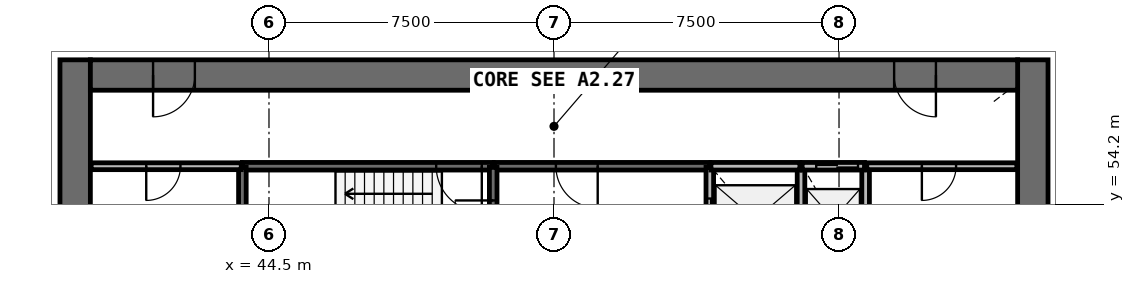
"""IFC4 building model, lengths in metres.
Left out: names, types, materials, properties, quantities, classifications, styles, units other than length and angle.
Written with IfcOpenShell. Run it as: python <this file> out.ifc"""

import sys

from ifc_helpers import new_model, si_unit, direction, frame, frame_2d, origin, place, context, subcontext, project, spatial, rectangle, extrude, source, transform, mapped, element, fill, save


model = new_model("IFC4")
c1 = context("Model", 3, precision=1e-05, world=origin(), true_north=direction((0.0, 1.0)))
c2 = subcontext(c1, "Body", "Model", "MODEL_VIEW")
j1 = project(units=[si_unit("LENGTHUNIT", "METRE"), si_unit("PLANEANGLEUNIT", "RADIAN")], contexts=[c1])
p1 = place(None, origin())
s1 = spatial("IfcSite", under=j1, at=p1, CompositionType="ELEMENT")
p2 = place(p1, origin())
s2 = spatial("IfcBuilding", under=s1, at=p2, CompositionType="ELEMENT")
p3 = place(p2, frame((0.0, 0.0, 112.6)))
s3 = spatial("IfcBuildingStorey", under=s2, at=p3, CompositionType="ELEMENT", Elevation=112.6)
p4 = place(p3, frame((64.6, 38.0, 0.0), z_axis=(0.0, 0.0, 1.0), x_axis=(0.0, 1.0, 0.0)))
e1 = element("IfcWall", 1, at=p4, inside=s3, PredefinedType="SHEAR", context=c2, shape_type="SweptSolid", body=[
    extrude(rectangle(XDim=20.0, YDim=0.8, at=frame_2d((10.0, 0.0))), origin(), (0.0, 0.0, 1.0), 4.1),
])
p5 = place(p4, frame((9.1, 0.0, 0.0)))
e2 = element("IfcOpeningElement", 2, at=p5, cuts=e1, PredefinedType="OPENING", context=c2, shape_type="SweptSolid", body=[
    extrude(rectangle(XDim=1.8, YDim=2.1, at=frame_2d((0.9, 1.05))), frame((0.0, 0.41, 0.0), z_axis=(0.0, -1.0, 0.0), x_axis=(1.0, 0.0, 0.0)), (0.0, 0.0, 1.0), 0.82),
])
p6 = place(p3, frame((39.4, 58.0, 0.0), z_axis=(0.0, 0.0, 1.0), x_axis=(0.0, -1.0, 0.0)))
e3 = element("IfcWall", 3, at=p6, inside=s3, PredefinedType="SHEAR", context=c2, shape_type="SweptSolid", body=[
    extrude(rectangle(XDim=20.0, YDim=0.8, at=frame_2d((10.0, 0.0))), origin(), (0.0, 0.0, 1.0), 4.1),
])
p7 = place(p6, frame((9.1, 0.0, 0.0)))
e4 = element("IfcOpeningElement", 4, at=p7, cuts=e3, PredefinedType="OPENING", context=c2, shape_type="SweptSolid", body=[
    extrude(rectangle(XDim=1.8, YDim=2.1, at=frame_2d((0.9, 1.05))), frame((0.0, 0.41, 0.0), z_axis=(0.0, -1.0, 0.0), x_axis=(1.0, 0.0, 0.0)), (0.0, 0.0, 1.0), 0.82),
])
p8 = place(p3, frame((64.2, 57.6, 0.0), z_axis=(0.0, 0.0, 1.0), x_axis=(-1.0, 0.0, 0.0)))
e5 = element("IfcWall", 5, at=p8, inside=s3, PredefinedType="SHEAR", context=c2, shape_type="SweptSolid", body=[
    extrude(rectangle(XDim=24.4, YDim=0.8, at=frame_2d((12.2, 0.0))), origin(), (0.0, 0.0, 1.0), 4.1),
])
p9 = place(p8, frame((21.65, 0.0, 0.0)))
e6 = element("IfcOpeningElement", 6, at=p9, cuts=e5, PredefinedType="OPENING", context=c2, shape_type="SweptSolid", body=[
    extrude(rectangle(XDim=1.1, YDim=2.1, at=frame_2d((0.55, 1.05))), frame((0.0, 0.41, 0.0), z_axis=(0.0, -1.0, 0.0), x_axis=(1.0, 0.0, 0.0)), (0.0, 0.0, 1.0), 0.82),
])
p10 = place(p8, frame((2.15, 0.0, 0.0)))
e7 = element("IfcOpeningElement", 7, at=p10, cuts=e5, PredefinedType="OPENING", context=c2, shape_type="SweptSolid", body=[
    extrude(rectangle(XDim=1.1, YDim=2.1, at=frame_2d((0.55, 1.05))), frame((0.0, 0.41, 0.0), z_axis=(0.0, -1.0, 0.0), x_axis=(1.0, 0.0, 0.0)), (0.0, 0.0, 1.0), 0.82),
])
p11 = place(p3, frame((50.4, 55.2, 0.0), z_axis=(0.0, 0.0, 1.0), x_axis=(-1.0, 0.0, 0.0)))
e8 = element("IfcWall", 8, at=p11, inside=s3, PredefinedType="SOLIDWALL", context=c2, shape_type="SweptSolid", body=[
    extrude(rectangle(XDim=6.6, YDim=0.2, at=frame_2d((3.3, 0.0))), origin(), (0.0, 0.0, 1.0), 3.7),
])
p12 = place(p11, frame((0.3, 0.0, 0.0)))
e9 = element("IfcOpeningElement", 9, at=p12, cuts=e8, PredefinedType="OPENING", context=c2, shape_type="SweptSolid", body=[
    extrude(rectangle(XDim=1.2, YDim=2.1, at=frame_2d((0.6, 1.05))), frame((0.0, 0.11, 0.0), z_axis=(0.0, -1.0, 0.0), x_axis=(1.0, 0.0, 0.0)), (0.0, 0.0, 1.0), 0.22),
])
p13 = place(p3, frame((56.1, 55.2, 0.0), z_axis=(0.0, 0.0, 1.0), x_axis=(-1.0, 0.0, 0.0)))
e10 = element("IfcWall", 10, at=p13, inside=s3, PredefinedType="SOLIDWALL", context=c2, shape_type="SweptSolid", body=[
    extrude(rectangle(XDim=5.67, YDim=0.2, at=frame_2d((2.835, 0.0))), origin(), (0.0, 0.0, 1.0), 3.7),
])
p14 = place(p13, frame((2.95, 0.0, 0.0)))
e11 = element("IfcOpeningElement", 11, at=p14, cuts=e10, PredefinedType="OPENING", context=c2, shape_type="SweptSolid", body=[
    extrude(rectangle(XDim=1.1, YDim=2.1, at=frame_2d((0.55, 1.05))), frame((0.0, 0.11, 0.0), z_axis=(0.0, -1.0, 0.0), x_axis=(1.0, 0.0, 0.0)), (0.0, 0.0, 1.0), 0.22),
])
p15 = place(p3, frame((50.4, 52.4, 0.0), z_axis=(0.0, 0.0, 1.0), x_axis=(0.0, 1.0, 0.0)))
e12 = element("IfcWall", 12, at=p15, inside=s3, PredefinedType="SOLIDWALL", context=c2, shape_type="SweptSolid", body=[
    extrude(rectangle(XDim=2.77, YDim=0.2, at=frame_2d((1.385, 0.0))), origin(), (0.0, 0.0, 1.0), 3.7),
])
p16 = place(p15, frame((0.9, 0.0, 0.0)))
e13 = element("IfcOpeningElement", 13, at=p16, cuts=e12, PredefinedType="OPENING", context=c2, shape_type="SweptSolid", body=[
    extrude(rectangle(XDim=1.0, YDim=2.1, at=frame_2d((0.5, 1.05))), frame((0.0, 0.11, 0.0), z_axis=(0.0, -1.0, 0.0), x_axis=(1.0, 0.0, 0.0)), (0.0, 0.0, 1.0), 0.22),
])
p17 = place(p3, frame((56.1, 55.17, 0.0), z_axis=(0.0, 0.0, 1.0), x_axis=(0.0, -1.0, 0.0)))
e14 = element("IfcWall", 14, at=p17, inside=s3, PredefinedType="SOLIDWALL", context=c2, shape_type="SweptSolid", body=[
    extrude(rectangle(XDim=2.77, YDim=0.2, at=frame_2d((1.385, 0.0))), origin(), (0.0, 0.0, 1.0), 3.7),
])
p18 = place(p17, frame((0.82, 0.0, 0.0)))
e15 = element("IfcOpeningElement", 15, at=p18, cuts=e14, PredefinedType="OPENING", context=c2, shape_type="SweptSolid", body=[
    extrude(rectangle(XDim=1.1, YDim=2.1, at=frame_2d((0.55, 1.05))), frame((0.0, 0.11, 0.0), z_axis=(0.0, -1.0, 0.0), x_axis=(1.0, 0.0, 0.0)), (0.0, 0.0, 1.0), 0.22),
])
for number, where, z_axis, x_axis in (
    (16, (58.5, 52.4, 0.0), (0.0, 0.0, 1.0), (0.0, 1.0, 0.0)),
    (17, (60.2, 52.4, 0.0), (0.0, 0.0, 1.0), (0.0, 1.0, 0.0)),
):
    element("IfcWall", number, at=place(p3, frame(where, z_axis=z_axis, x_axis=x_axis)), inside=s3, PredefinedType="SOLIDWALL", context=c2, shape_type="SweptSolid", body=[
        extrude(rectangle(XDim=2.8, YDim=0.2, at=frame_2d((1.4, 0.0))), origin(), (0.0, 0.0, 1.0), 3.7),
    ])
p19 = place(p3, frame((58.47, 55.2, 0.0), z_axis=(0.0, 0.0, 1.0), x_axis=(-1.0, 0.0, 0.0)))
e18 = element("IfcWall", 18, at=p19, inside=s3, PredefinedType="SOLIDWALL", context=c2, shape_type="SweptSolid", body=[
    extrude(rectangle(XDim=2.34, YDim=0.2, at=frame_2d((1.17, 0.0))), origin(), (0.0, 0.0, 1.0), 3.7),
])
p20 = place(p3, frame((43.8, 55.17, 0.0), z_axis=(0.0, 0.0, 1.0), x_axis=(0.0, -1.0, 0.0)))
e19 = element("IfcWall", 19, at=p20, inside=s3, PredefinedType="SOLIDWALL", context=c2, shape_type="SweptSolid", body=[
    extrude(rectangle(XDim=2.14, YDim=0.2, at=frame_2d((1.07, 0.0))), origin(), (0.0, 0.0, 1.0), 3.7),
])
p21 = place(p3, frame((60.17, 55.2, 0.0), z_axis=(0.0, 0.0, 1.0), x_axis=(-1.0, 0.0, 0.0)))
e20 = element("IfcWall", 20, at=p21, inside=s3, PredefinedType="SOLIDWALL", context=c2, shape_type="SweptSolid", body=[
    extrude(rectangle(XDim=1.64, YDim=0.2, at=frame_2d((0.82, 0.0))), origin(), (0.0, 0.0, 1.0), 3.7),
])
p22 = place(p21, frame((0.17, 0.0, 0.0)))
e21 = element("IfcOpeningElement", 21, at=p22, cuts=e20, PredefinedType="OPENING", context=c2, shape_type="SweptSolid", body=[
    extrude(rectangle(XDim=1.1, YDim=2.1, at=frame_2d((0.55, 1.05))), frame((0.0, 0.11, 0.0), z_axis=(0.0, -1.0, 0.0), x_axis=(1.0, 0.0, 0.0)), (0.0, 0.0, 1.0), 0.22),
])
p23 = place(p3, frame((64.18, 55.2, 0.0), z_axis=(0.0, 0.0, 1.0), x_axis=(-1.0, 0.0, 0.0)))
e22 = element("IfcWall", 22, at=p23, inside=s3, PredefinedType="PARTITIONING", context=c2, shape_type="SweptSolid", body=[
    extrude(rectangle(XDim=3.95, YDim=0.18, at=frame_2d((1.975, 0.0))), origin(), (0.0, 0.0, 1.0), 3.7),
])
p24 = place(p23, frame((1.6, 0.0, 0.0)))
e23 = element("IfcOpeningElement", 23, at=p24, cuts=e22, PredefinedType="OPENING", context=c2, shape_type="SweptSolid", body=[
    extrude(rectangle(XDim=0.9, YDim=2.1, at=frame_2d((0.45, 1.05))), frame((0.0, 0.1, 0.0), z_axis=(0.0, -1.0, 0.0), x_axis=(1.0, 0.0, 0.0)), (0.0, 0.0, 1.0), 0.2),
])
p25 = place(p3, frame((43.77, 55.2, 0.0), z_axis=(0.0, 0.0, 1.0), x_axis=(-1.0, 0.0, 0.0)))
e24 = element("IfcWall", 24, at=p25, inside=s3, PredefinedType="PARTITIONING", context=c2, shape_type="SweptSolid", body=[
    extrude(rectangle(XDim=3.95, YDim=0.18, at=frame_2d((1.975, 0.0))), origin(), (0.0, 0.0, 1.0), 3.7),
])
p26 = place(p25, frame((1.6, 0.0, 0.0)))
e25 = element("IfcOpeningElement", 25, at=p26, cuts=e24, PredefinedType="OPENING", context=c2, shape_type="SweptSolid", body=[
    extrude(rectangle(XDim=0.9, YDim=2.1, at=frame_2d((0.45, 1.05))), frame((0.0, 0.1, 0.0), z_axis=(0.0, -1.0, 0.0), x_axis=(1.0, 0.0, 0.0)), (0.0, 0.0, 1.0), 0.2),
])
m1 = source(origin(), c2, "Body", "SweptSolid", [
    extrude(rectangle(XDim=1.1, YDim=2.1, at=frame_2d((0.55, 1.05))), frame((0.0, 0.025, 0.0), z_axis=(0.0, -1.0, 0.0), x_axis=(1.0, 0.0, 0.0)), (0.0, 0.0, 1.0), 0.05),
])
p27 = place(p18, origin())
e26 = element("IfcDoor", 26, at=p27, inside=s3, OperationType="DOUBLE_DOOR_SLIDING", PredefinedType="USERDEFINED", context=c2, shape_type="MappedRepresentation", body=[
    mapped(m1, transform((0.0, 0.0, 0.0), scale=1.0)),
])
fill(e15, e26)
p28 = place(p22, origin())
e27 = element("IfcDoor", 27, at=p28, inside=s3, OperationType="DOUBLE_DOOR_SLIDING", PredefinedType="USERDEFINED", context=c2, shape_type="MappedRepresentation", body=[
    mapped(m1, transform((0.0, 0.0, 0.0), scale=1.0)),
])
fill(e21, e27)
m2 = source(origin(), c2, "Body", "SweptSolid", [
    extrude(rectangle(XDim=1.2, YDim=2.1, at=frame_2d((0.6, 1.05))), frame((0.0, 0.025, 0.0), z_axis=(0.0, -1.0, 0.0), x_axis=(1.0, 0.0, 0.0)), (0.0, 0.0, 1.0), 0.05),
])
p29 = place(p12, origin())
e28 = element("IfcDoor", 28, at=p29, inside=s3, OperationType="SINGLE_SWING_LEFT", PredefinedType="DOOR", context=c2, shape_type="MappedRepresentation", body=[
    mapped(m2, transform((0.0, 0.0, 0.0), scale=1.0)),
])
fill(e9, e28)
m3 = source(origin(), c2, "Body", "SweptSolid", [
    extrude(rectangle(XDim=1.0, YDim=2.1, at=frame_2d((0.5, 1.05))), frame((0.0, 0.025, 0.0), z_axis=(0.0, -1.0, 0.0), x_axis=(1.0, 0.0, 0.0)), (0.0, 0.0, 1.0), 0.05),
])
p30 = place(p16, origin())
e29 = element("IfcDoor", 29, at=p30, inside=s3, OperationType="SINGLE_SWING_RIGHT", PredefinedType="DOOR", context=c2, shape_type="MappedRepresentation", body=[
    mapped(m3, transform((0.0, 0.0, 0.0), scale=1.0)),
])
fill(e13, e29)
m4 = source(origin(), c2, "Body", "SweptSolid", [
    extrude(rectangle(XDim=1.1, YDim=2.1, at=frame_2d((0.55, 1.05))), frame((0.0, 0.025, 0.0), z_axis=(0.0, -1.0, 0.0), x_axis=(1.0, 0.0, 0.0)), (0.0, 0.0, 1.0), 0.05),
])
p31 = place(p14, origin())
e30 = element("IfcDoor", 30, at=p31, inside=s3, OperationType="SINGLE_SWING_LEFT", PredefinedType="DOOR", context=c2, shape_type="MappedRepresentation", body=[
    mapped(m4, transform((0.0, 0.0, 0.0), scale=1.0)),
])
fill(e11, e30)
m5 = source(origin(), c2, "Body", "SweptSolid", [
    extrude(rectangle(XDim=1.1, YDim=2.1, at=frame_2d((0.55, 1.05))), frame((0.0, 0.025, 0.0), z_axis=(0.0, -1.0, 0.0), x_axis=(1.0, 0.0, 0.0)), (0.0, 0.0, 1.0), 0.05),
])
p32 = place(p9, origin())
e31 = element("IfcDoor", 31, at=p32, inside=s3, OperationType="SINGLE_SWING_RIGHT", PredefinedType="DOOR", context=c2, shape_type="MappedRepresentation", body=[
    mapped(m5, transform((0.0, 0.0, 0.0), scale=1.0)),
])
fill(e6, e31)
p33 = place(p10, origin())
e32 = element("IfcDoor", 32, at=p33, inside=s3, OperationType="SINGLE_SWING_LEFT", PredefinedType="DOOR", context=c2, shape_type="MappedRepresentation", body=[
    mapped(m5, transform((0.0, 0.0, 0.0), scale=1.0)),
])
fill(e7, e32)
m6 = source(origin(), c2, "Body", "SweptSolid", [
    extrude(rectangle(XDim=0.9, YDim=2.1, at=frame_2d((0.45, 1.05))), frame((0.0, 0.025, 0.0), z_axis=(0.0, -1.0, 0.0), x_axis=(1.0, 0.0, 0.0)), (0.0, 0.0, 1.0), 0.05),
])
p34 = place(p26, origin())
e33 = element("IfcDoor", 33, at=p34, inside=s3, OperationType="SINGLE_SWING_RIGHT", PredefinedType="DOOR", context=c2, shape_type="MappedRepresentation", body=[
    mapped(m6, transform((0.0, 0.0, 0.0), scale=1.0)),
])
fill(e25, e33)
p35 = place(p24, origin())
e34 = element("IfcDoor", 34, at=p35, inside=s3, OperationType="SINGLE_SWING_RIGHT", PredefinedType="DOOR", context=c2, shape_type="MappedRepresentation", body=[
    mapped(m6, transform((0.0, 0.0, 0.0), scale=1.0)),
])
fill(e23, e34)
save(model, sys.argv[1])
